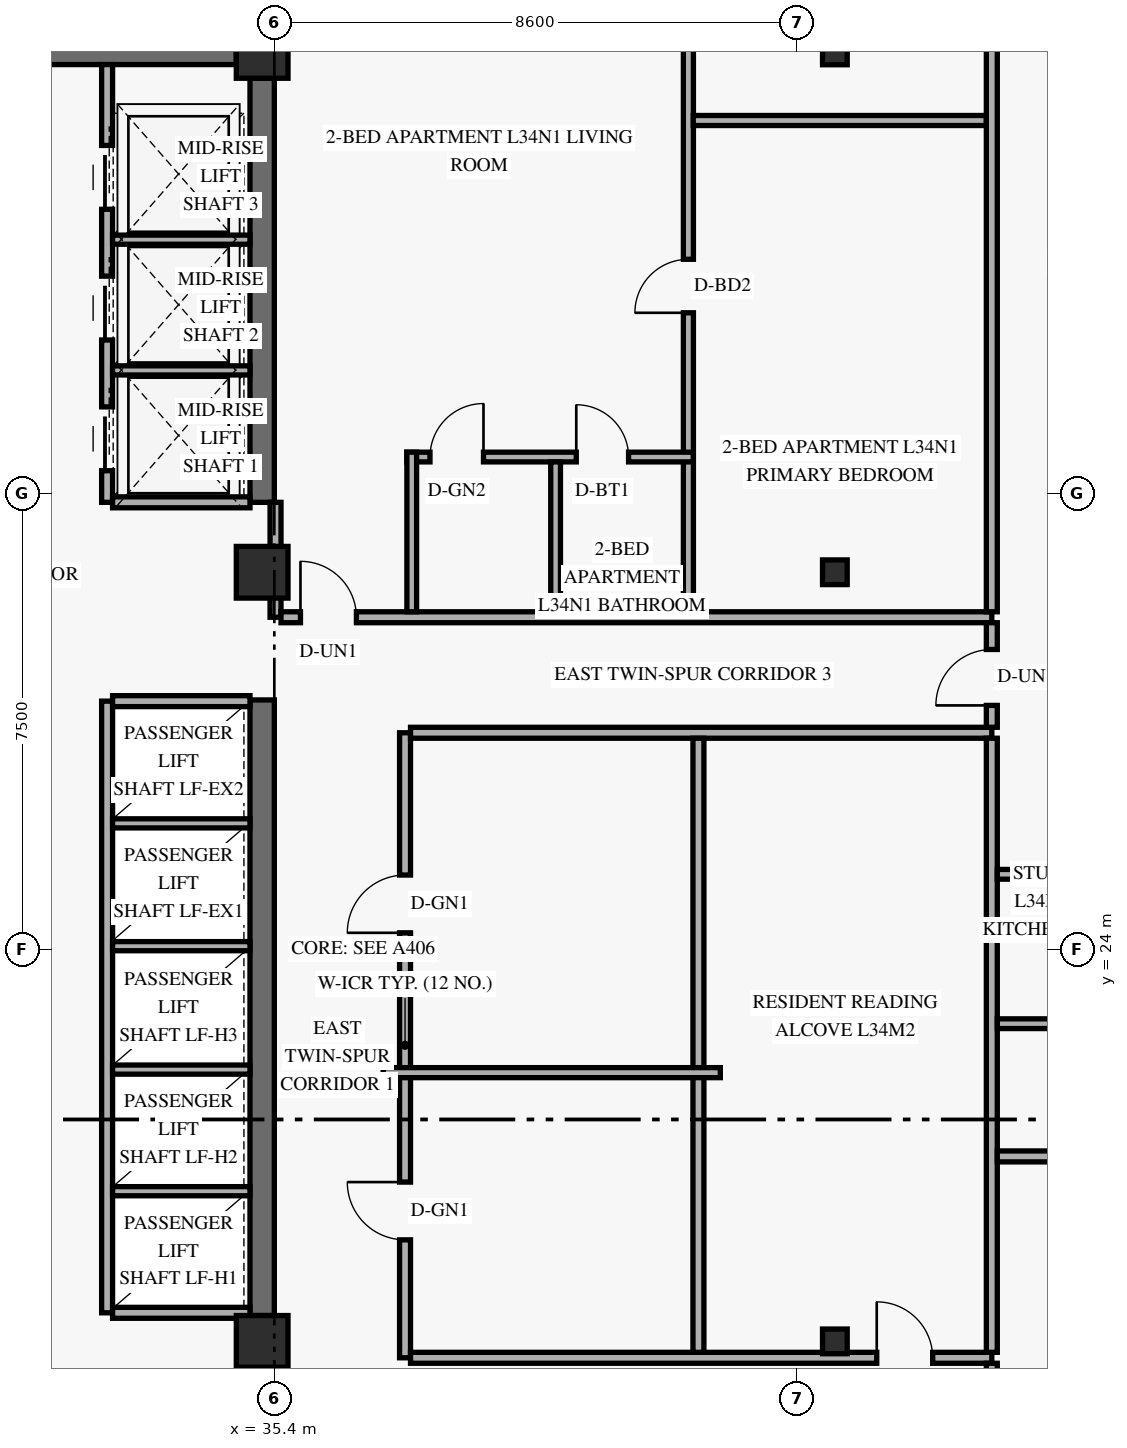
"""IFC4 building model, lengths in metres.
Left out: names, types, materials, properties, quantities, classifications, styles, units other than length and angle.
Written with IfcOpenShell. Run it as: python <this file> out.ifc"""

import sys

from ifc_helpers import new_model, si_unit, direction, frame, frame_2d, origin, origin_2d, place, context, subcontext, project, spatial, rectangle, hollow_rectangle, extrude, element, fill, save


model = new_model("IFC4")
c1 = context("Model", 3, precision=1e-05, world=origin(), true_north=direction((0.0, 1.0)))
c2 = subcontext(c1, "Body", "Model", "MODEL_VIEW")
j1 = project(units=[si_unit("LENGTHUNIT", "METRE"), si_unit("PLANEANGLEUNIT", "RADIAN")], contexts=[c1])
p1 = place(None, origin())
s1 = spatial("IfcSite", under=j1, at=p1, CompositionType="ELEMENT")
p2 = place(p1, origin())
s2 = spatial("IfcBuilding", under=s1, at=p2, CompositionType="ELEMENT")
p3 = place(p2, frame((0.0, 0.0, 132.0)))
s3 = spatial("IfcBuildingStorey", under=s2, at=p3, CompositionType="ELEMENT", Elevation=132.0)
p4 = place(p3, frame((35.2, 17.975, 0.0), z_axis=(0.0, 0.0, 1.0), x_axis=(0.0, 1.0, 0.0)))
e1 = element("IfcWall", 1, at=p4, inside=s3, PredefinedType="SHEAR", context=c2, shape_type="SweptSolid", body=[
    extrude(rectangle(XDim=10.125, YDim=0.4, at=frame_2d((5.062, 0.0))), origin(), (0.0, 0.0, 1.0), 2.689),
])
p5 = place(p3, frame((35.2, 31.35, 0.0), z_axis=(0.0, 0.0, 1.0), x_axis=(0.0, 1.0, 0.0)))
e2 = element("IfcWall", 2, at=p5, inside=s3, PredefinedType="SHEAR", context=c2, shape_type="SweptSolid", body=[
    extrude(rectangle(XDim=6.975, YDim=0.4, at=frame_2d((3.487, 0.0))), origin(), (0.0, 0.0, 1.0), 2.689),
])
p6 = place(p3, frame((24.625, 38.75, 0.0), z_axis=(0.0, 0.0, 1.0), x_axis=(1.0, 0.0, 0.0)))
e3 = element("IfcWall", 3, at=p6, inside=s3, PredefinedType="SHEAR", context=c2, shape_type="SweptSolid", body=[
    extrude(rectangle(XDim=10.15, YDim=0.4, at=frame_2d((5.075, 0.0))), origin(), (0.0, 0.0, 1.0), 3.3),
])
p7 = place(p6, frame((5.2, 0.0, 0.0)))
e4 = element("IfcOpeningElement", 4, at=p7, cuts=e3, PredefinedType="OPENING", context=c2, shape_type="SweptSolid", body=[
    extrude(rectangle(XDim=1.05, YDim=2.15, at=frame_2d((0.525, 1.075))), frame((0.0, 0.21, 0.0), z_axis=(0.0, -1.0, 0.0), x_axis=(1.0, 0.0, 0.0)), (0.0, 0.0, 1.0), 0.42),
])
for number, where, z_axis, x_axis in (
    (5, (35.2, 17.55, 0.0), (0.0, 0.0, 1.0), (1.0, 0.0, 0.0)),
    (6, (35.2, 30.2, 0.0), (0.0, 0.0, 1.0), (1.0, 0.0, 0.0)),
    (7, (35.2, 38.75, 0.0), (0.0, 0.0, 1.0), (1.0, 0.0, 0.0)),
):
    element("IfcColumn", number, at=place(p3, frame(where, z_axis=z_axis, x_axis=x_axis)), inside=s3, PredefinedType="COLUMN", context=c2, shape_type="SweptSolid", body=[
        extrude(rectangle(XDim=0.85, YDim=0.85, at=origin_2d()), origin(), (0.0, 0.0, 1.0), 3.6),
    ])
for number, where, z_axis, x_axis in (
    (8, (44.556, 17.55, 0.0), (0.035, 0.0, 0.999), (0.0, 1.0, 0.0)),
    (9, (44.556, 30.2, 0.0), (0.035, 0.0, 0.999), (0.0, 1.0, 0.0)),
    (10, (44.556, 38.75, 0.0), (0.035, 0.0, 0.999), (0.0, 1.0, 0.0)),
):
    element("IfcColumn", number, at=place(p3, frame(where, z_axis=z_axis, x_axis=x_axis)), inside=s3, PredefinedType="COLUMN", context=c2, shape_type="SweptSolid", body=[
        extrude(hollow_rectangle(XDim=0.406, YDim=0.406, WallThickness=0.016, at=origin_2d()), origin(), (0.0, 0.0, 1.0), 3.602),
    ])
p8 = place(p3, frame((32.65, 18.02, 0.0), z_axis=(0.0, 0.0, 1.0), x_axis=(0.0, 1.0, 0.0)))
e11 = element("IfcWall", 11, at=p8, inside=s3, PredefinedType="STANDARD", context=c2, shape_type="SweptSolid", body=[
    extrude(rectangle(XDim=10.06, YDim=0.18, at=frame_2d((5.03, 0.0))), origin(), (0.0, 0.0, 1.0), 3.3),
])
for number, where, z_axis, x_axis in (
    (12, (32.74, 18.02, 0.0), (0.0, 0.0, 1.0), (1.0, 0.0, 0.0)),
    (13, (32.74, 28.08, 0.0), (0.0, 0.0, 1.0), (1.0, 0.0, 0.0)),
):
    element("IfcWall", number, at=place(p3, frame(where, z_axis=z_axis, x_axis=x_axis)), inside=s3, PredefinedType="STANDARD", context=c2, shape_type="SweptSolid", body=[
        extrude(rectangle(XDim=2.26, YDim=0.18, at=frame_2d((1.13, 0.0))), origin(), (0.0, 0.0, 1.0), 3.3),
    ])
for number, where, z_axis, x_axis in (
    (14, (32.74, 20.02, 0.0), (0.0, 0.0, 1.0), (1.0, 0.0, 0.0)),
    (15, (32.74, 22.02, 0.0), (0.0, 0.0, 1.0), (1.0, 0.0, 0.0)),
    (16, (32.74, 24.05, 0.0), (0.0, 0.0, 1.0), (1.0, 0.0, 0.0)),
    (17, (32.74, 26.07, 0.0), (0.0, 0.0, 1.0), (1.0, 0.0, 0.0)),
):
    element("IfcWall", number, at=place(p3, frame(where, z_axis=z_axis, x_axis=x_axis)), inside=s3, PredefinedType="STANDARD", context=c2, shape_type="SweptSolid", body=[
        extrude(rectangle(XDim=2.26, YDim=0.15, at=frame_2d((1.13, 0.0))), origin(), (0.0, 0.0, 1.0), 3.3),
    ])
p9 = place(p3, frame((32.65, 31.35, 0.0), z_axis=(0.0, 0.0, 1.0), x_axis=(0.0, 1.0, 0.0)))
e18 = element("IfcWall", 18, at=p9, inside=s3, PredefinedType="STANDARD", context=c2, shape_type="SweptSolid", body=[
    extrude(rectangle(XDim=7.2, YDim=0.18, at=frame_2d((3.6, 0.0))), origin(), (0.0, 0.0, 1.0), 3.3),
])
p10 = place(p9, frame((0.52, 0.0, 0.0)))
e19 = element("IfcOpeningElement", 19, at=p10, cuts=e18, PredefinedType="OPENING", context=c2, shape_type="SweptSolid", body=[
    extrude(rectangle(XDim=1.05, YDim=2.2, at=frame_2d((0.525, 1.1))), frame((0.0, 0.1, 0.0), z_axis=(0.0, -1.0, 0.0), x_axis=(1.0, 0.0, 0.0)), (0.0, 0.0, 1.0), 0.2),
])
p11 = place(p9, frame((2.67, 0.0, 0.0)))
e20 = element("IfcOpeningElement", 20, at=p11, cuts=e18, PredefinedType="OPENING", context=c2, shape_type="SweptSolid", body=[
    extrude(rectangle(XDim=1.05, YDim=2.2, at=frame_2d((0.525, 1.1))), frame((0.0, 0.1, 0.0), z_axis=(0.0, -1.0, 0.0), x_axis=(1.0, 0.0, 0.0)), (0.0, 0.0, 1.0), 0.2),
])
p12 = place(p9, frame((4.82, 0.0, 0.0)))
e21 = element("IfcOpeningElement", 21, at=p12, cuts=e18, PredefinedType="OPENING", context=c2, shape_type="SweptSolid", body=[
    extrude(rectangle(XDim=1.05, YDim=2.2, at=frame_2d((0.525, 1.1))), frame((0.0, 0.1, 0.0), z_axis=(0.0, -1.0, 0.0), x_axis=(1.0, 0.0, 0.0)), (0.0, 0.0, 1.0), 0.2),
])
p13 = place(p3, frame((32.74, 31.35, 0.0), z_axis=(0.0, 0.0, 1.0), x_axis=(1.0, 0.0, 0.0)))
e22 = element("IfcWall", 22, at=p13, inside=s3, PredefinedType="STANDARD", context=c2, shape_type="SweptSolid", body=[
    extrude(rectangle(XDim=2.26, YDim=0.18, at=frame_2d((1.13, 0.0))), origin(), (0.0, 0.0, 1.0), 3.3),
])
for number, where, z_axis, x_axis in (
    (23, (32.74, 33.52, 0.0), (0.0, 0.0, 1.0), (1.0, 0.0, 0.0)),
    (24, (32.74, 35.67, 0.0), (0.0, 0.0, 1.0), (1.0, 0.0, 0.0)),
):
    element("IfcWall", number, at=place(p3, frame(where, z_axis=z_axis, x_axis=x_axis)), inside=s3, PredefinedType="STANDARD", context=c2, shape_type="SweptSolid", body=[
        extrude(rectangle(XDim=2.26, YDim=0.15, at=frame_2d((1.13, 0.0))), origin(), (0.0, 0.0, 1.0), 3.3),
    ])
p14 = place(p3, frame((37.55, 17.28, 0.0), z_axis=(0.0, 0.0, 1.0), x_axis=(0.0, 1.0, 0.0)))
e25 = element("IfcWall", 25, at=p14, inside=s3, PredefinedType="STANDARD", context=c2, shape_type="SweptSolid", body=[
    extrude(rectangle(XDim=10.28, YDim=0.18, at=frame_2d((5.14, 0.0))), origin(), (0.0, 0.0, 1.0), 2.671),
])
p15 = place(p14, frame((1.94, 0.0, 0.0)))
e26 = element("IfcOpeningElement", 26, at=p15, cuts=e25, PredefinedType="OPENING", context=c2, shape_type="SweptSolid", body=[
    extrude(rectangle(XDim=0.95, YDim=2.15, at=frame_2d((0.475, 1.075))), frame((0.0, 0.1, 0.0), z_axis=(0.0, -1.0, 0.0), x_axis=(1.0, 0.0, 0.0)), (0.0, 0.0, 1.0), 0.2),
])
p16 = place(p14, frame((6.99, 0.0, 0.0)))
e27 = element("IfcOpeningElement", 27, at=p16, cuts=e25, PredefinedType="OPENING", context=c2, shape_type="SweptSolid", body=[
    extrude(rectangle(XDim=0.95, YDim=2.15, at=frame_2d((0.475, 1.075))), frame((0.0, 0.1, 0.0), z_axis=(0.0, -1.0, 0.0), x_axis=(1.0, 0.0, 0.0)), (0.0, 0.0, 1.0), 0.2),
])
p17 = place(p3, frame((37.64, 17.28, 0.0), z_axis=(0.0, 0.0, 1.0), x_axis=(1.0, 0.0, 0.0)))
e28 = element("IfcWall", 28, at=p17, inside=s3, PredefinedType="STANDARD", context=c2, shape_type="SweptSolid", body=[
    extrude(rectangle(XDim=9.56, YDim=0.18, at=frame_2d((4.78, 0.0))), origin(), (0.0, 0.0, 1.0), 2.671),
])
p18 = place(p17, frame((7.667, 0.0, 0.0)))
e29 = element("IfcOpeningElement", 29, at=p18, cuts=e28, PredefinedType="OPENING", context=c2, shape_type="SweptSolid", body=[
    extrude(rectangle(XDim=0.92, YDim=2.15, at=frame_2d((0.46, 1.075))), frame((0.0, 0.1, 0.0), z_axis=(0.0, -1.0, 0.0), x_axis=(1.0, 0.0, 0.0)), (0.0, 0.0, 1.0), 0.2),
])
p19 = place(p3, frame((37.64, 27.56, 0.0), z_axis=(0.0, 0.0, 1.0), x_axis=(1.0, 0.0, 0.0)))
e30 = element("IfcWall", 30, at=p19, inside=s3, PredefinedType="STANDARD", context=c2, shape_type="SweptSolid", body=[
    extrude(rectangle(XDim=9.56, YDim=0.18, at=frame_2d((4.78, 0.0))), origin(), (0.0, 0.0, 1.0), 2.671),
])
p20 = place(p3, frame((35.42, 29.46, 0.0), z_axis=(0.0, 0.0, 1.0), x_axis=(0.0, 1.0, 0.0)))
e31 = element("IfcWall", 31, at=p20, inside=s3, PredefinedType="STANDARD", context=c2, shape_type="SweptSolid", body=[
    extrude(rectangle(XDim=1.89, YDim=0.18, at=frame_2d((0.945, 0.0))), origin(), (0.0, 0.0, 1.0), 2.671),
])
p21 = place(p3, frame((35.51, 29.46, 0.0), z_axis=(0.0, 0.0, 1.0), x_axis=(1.0, 0.0, 0.0)))
e32 = element("IfcWall", 32, at=p21, inside=s3, PredefinedType="STANDARD", context=c2, shape_type="SweptSolid", body=[
    extrude(rectangle(XDim=11.69, YDim=0.18, at=frame_2d((5.845, 0.0))), origin(), (0.0, 0.0, 1.0), 2.671),
])
p22 = place(p21, frame((0.32, 0.0, 0.0)))
e33 = element("IfcOpeningElement", 33, at=p22, cuts=e32, PredefinedType="OPENING", context=c2, shape_type="SweptSolid", body=[
    extrude(rectangle(XDim=0.92, YDim=2.15, at=frame_2d((0.46, 1.075))), frame((0.0, 0.1, 0.0), z_axis=(0.0, -1.0, 0.0), x_axis=(1.0, 0.0, 0.0)), (0.0, 0.0, 1.0), 0.2),
])
p23 = place(p3, frame((42.21, 29.55, 0.0), z_axis=(0.0, 0.0, 1.0), x_axis=(0.0, 1.0, 0.0)))
e34 = element("IfcWall", 34, at=p23, inside=s3, PredefinedType="PARTITIONING", context=c2, shape_type="SweptSolid", body=[
    extrude(rectangle(XDim=15.47, YDim=0.165, at=frame_2d((7.735, 0.0))), origin(), (0.0, 0.0, 1.0), 2.671),
])
p24 = place(p23, frame((4.917, 0.0, 0.0)))
e35 = element("IfcOpeningElement", 35, at=p24, cuts=e34, PredefinedType="OPENING", context=c2, shape_type="SweptSolid", body=[
    extrude(rectangle(XDim=0.88, YDim=2.14, at=frame_2d((0.44, 1.07))), frame((0.0, 0.093, 0.0), z_axis=(0.0, -1.0, 0.0), x_axis=(1.0, 0.0, 0.0)), (0.0, 0.0, 1.0), 0.185),
])
p25 = place(p23, frame((9.255, 0.0, 0.0)))
e36 = element("IfcOpeningElement", 36, at=p25, cuts=e34, PredefinedType="OPENING", context=c2, shape_type="SweptSolid", body=[
    extrude(rectangle(XDim=0.88, YDim=2.14, at=frame_2d((0.44, 1.07))), frame((0.0, 0.093, 0.0), z_axis=(0.0, -1.0, 0.0), x_axis=(1.0, 0.0, 0.0)), (0.0, 0.0, 1.0), 0.185),
])
p26 = place(p3, frame((37.58, 32.095, 0.0), z_axis=(0.0, 0.0, 1.0), x_axis=(1.0, 0.0, 0.0)))
e37 = element("IfcWall", 37, at=p26, inside=s3, PredefinedType="PLUMBINGWALL", context=c2, shape_type="SweptSolid", body=[
    extrude(rectangle(XDim=4.71, YDim=0.16, at=frame_2d((2.355, 0.0))), origin(), (0.0, 0.0, 1.0), 3.3),
])
p27 = place(p26, frame((0.38, 0.0, 0.0)))
e38 = element("IfcOpeningElement", 38, at=p27, cuts=e37, PredefinedType="OPENING", context=c2, shape_type="SweptSolid", body=[
    extrude(rectangle(XDim=0.88, YDim=2.12, at=frame_2d((0.44, 1.06))), frame((0.0, 0.09, 0.0), z_axis=(0.0, -1.0, 0.0), x_axis=(1.0, 0.0, 0.0)), (0.0, 0.0, 1.0), 0.18),
])
p28 = place(p26, frame((2.786, 0.0, 0.0)))
e39 = element("IfcOpeningElement", 39, at=p28, cuts=e37, PredefinedType="OPENING", context=c2, shape_type="SweptSolid", body=[
    extrude(rectangle(XDim=0.86, YDim=2.12, at=frame_2d((0.43, 1.06))), frame((0.0, 0.09, 0.0), z_axis=(0.0, -1.0, 0.0), x_axis=(1.0, 0.0, 0.0)), (0.0, 0.0, 1.0), 0.18),
])
p29 = place(p3, frame((37.66, 29.55, 0.0), z_axis=(0.0, 0.0, 1.0), x_axis=(0.0, 1.0, 0.0)))
e40 = element("IfcWall", 40, at=p29, inside=s3, PredefinedType="PLUMBINGWALL", context=c2, shape_type="SweptSolid", body=[
    extrude(rectangle(XDim=2.625, YDim=0.16, at=frame_2d((1.312, 0.0))), origin(), (0.0, 0.0, 1.0), 2.671),
])
p30 = place(p3, frame((40.026, 29.55, 0.0), z_axis=(0.0, 0.0, 1.0), x_axis=(0.0, 1.0, 0.0)))
e41 = element("IfcWall", 41, at=p30, inside=s3, PredefinedType="PLUMBINGWALL", context=c2, shape_type="SweptSolid", body=[
    extrude(rectangle(XDim=2.465, YDim=0.16, at=frame_2d((1.232, 0.0))), origin(), (0.0, 0.0, 1.0), 2.671),
])
p31 = place(p3, frame((42.29, 37.63, 0.0), z_axis=(0.0, 0.0, 1.0), x_axis=(1.0, 0.0, 0.0)))
e42 = element("IfcWall", 42, at=p31, inside=s3, PredefinedType="PARTITIONING", context=c2, shape_type="SweptSolid", body=[
    extrude(rectangle(XDim=4.82, YDim=0.165, at=frame_2d((2.41, 0.0))), origin(), (0.0, 0.0, 1.0), 2.671),
])
p32 = place(p3, frame((42.375, 17.37, 0.0), z_axis=(0.0, 0.0, 1.0), x_axis=(0.0, 1.0, 0.0)))
e43 = element("IfcWall", 43, at=p32, inside=s3, PredefinedType="PARTITIONING", context=c2, shape_type="SweptSolid", body=[
    extrude(rectangle(XDim=10.1, YDim=0.18, at=frame_2d((5.05, 0.0))), origin(), (0.0, 0.0, 1.0), 2.671),
])
p33 = place(p3, frame((37.19, 21.97, 0.0), z_axis=(0.0, 0.0, 1.0), x_axis=(1.0, 0.0, 0.0)))
e44 = element("IfcWall", 44, at=p33, inside=s3, PredefinedType="PARTITIONING", context=c2, shape_type="SweptSolid", body=[
    extrude(rectangle(XDim=5.545, YDim=0.165, at=frame_2d((2.772, 0.0))), origin(), (0.0, 0.0, 1.0), 3.3),
])
p34 = place(p3, frame((47.2, 15.67, 0.0), z_axis=(0.0, 0.0, 1.0), x_axis=(0.0, 1.0, 0.0)))
e45 = element("IfcWall", 45, at=p34, inside=s3, PredefinedType="STANDARD", context=c2, shape_type="SweptSolid", body=[
    extrude(rectangle(XDim=1.52, YDim=0.18, at=frame_2d((0.76, 0.0))), origin(), (0.0, 0.0, 1.0), 3.3),
])
p35 = place(p34, frame((0.29, 0.0, 0.0)))
e46 = element("IfcOpeningElement", 46, at=p35, cuts=e45, PredefinedType="OPENING", context=c2, shape_type="SweptSolid", body=[
    extrude(rectangle(XDim=0.92, YDim=2.15, at=frame_2d((0.46, 1.075))), frame((0.0, 0.1, 0.0), z_axis=(0.0, -1.0, 0.0), x_axis=(1.0, 0.0, 0.0)), (0.0, 0.0, 1.0), 0.2),
])
p36 = place(p3, frame((47.2, 27.65, 0.0), z_axis=(0.0, 0.0, 1.0), x_axis=(0.0, 1.0, 0.0)))
e47 = element("IfcWall", 47, at=p36, inside=s3, PredefinedType="STANDARD", context=c2, shape_type="SweptSolid", body=[
    extrude(rectangle(XDim=1.72, YDim=0.18, at=frame_2d((0.86, 0.0))), origin(), (0.0, 0.0, 1.0), 3.3),
])
p37 = place(p36, frame((0.36, 0.0, 0.0)))
e48 = element("IfcOpeningElement", 48, at=p37, cuts=e47, PredefinedType="OPENING", context=c2, shape_type="SweptSolid", body=[
    extrude(rectangle(XDim=0.92, YDim=2.15, at=frame_2d((0.46, 1.075))), frame((0.0, 0.1, 0.0), z_axis=(0.0, -1.0, 0.0), x_axis=(1.0, 0.0, 0.0)), (0.0, 0.0, 1.0), 0.2),
])
p38 = place(p3, frame((47.2, 17.37, 0.0), z_axis=(0.0, 0.0, 1.0), x_axis=(0.0, 1.0, 0.0)))
e49 = element("IfcWall", 49, at=p38, inside=s3, PredefinedType="PARTITIONING", context=c2, shape_type="SweptSolid", body=[
    extrude(rectangle(XDim=10.1, YDim=0.18, at=frame_2d((5.05, 0.0))), origin(), (0.0, 0.0, 1.0), 2.671),
])
p39 = place(p3, frame((47.2, 29.55, 0.0), z_axis=(0.0, 0.0, 1.0), x_axis=(0.0, 1.0, 0.0)))
e50 = element("IfcWall", 50, at=p39, inside=s3, PredefinedType="PARTITIONING", context=c2, shape_type="SweptSolid", body=[
    extrude(rectangle(XDim=15.47, YDim=0.18, at=frame_2d((7.735, 0.0))), origin(), (0.0, 0.0, 1.0), 2.671),
])
p40 = place(p3, frame((47.29, 20.592, 0.0), z_axis=(0.0, 0.0, 1.0), x_axis=(1.0, 0.0, 0.0)))
e51 = element("IfcWall", 51, at=p40, inside=s3, PredefinedType="PARTITIONING", context=c2, shape_type="SweptSolid", body=[
    extrude(rectangle(XDim=6.03, YDim=0.18, at=frame_2d((3.015, 0.0))), origin(), (0.0, 0.0, 1.0), 2.749),
])
p41 = place(p3, frame((47.29, 25.232, 0.0), z_axis=(0.0, 0.0, 1.0), x_axis=(1.0, 0.0, 0.0)))
e52 = element("IfcWall", 52, at=p41, inside=s3, PredefinedType="PLUMBINGWALL", context=c2, shape_type="SweptSolid", body=[
    extrude(rectangle(XDim=2.606, YDim=0.16, at=frame_2d((1.303, 0.0))), origin(), (0.0, 0.0, 1.0), 3.3),
])
p42 = place(p3, frame((47.29, 22.775, 0.0), z_axis=(0.0, 0.0, 1.0), x_axis=(1.0, 0.0, 0.0)))
e53 = element("IfcWall", 53, at=p42, inside=s3, PredefinedType="PLUMBINGWALL", context=c2, shape_type="SweptSolid", body=[
    extrude(rectangle(XDim=2.446, YDim=0.16, at=frame_2d((1.223, 0.0))), origin(), (0.0, 0.0, 1.0), 3.3),
])
p43 = place(p10, origin())
e54 = element("IfcDoor", 54, at=p43, inside=s3, OperationType="SLIDING_TO_LEFT", PredefinedType="DOOR", context=c2, shape_type="SweptSolid", body=[
    extrude(rectangle(XDim=1.05, YDim=2.2, at=frame_2d((0.525, 1.1))), frame((0.0, 0.025, 0.0), z_axis=(0.0, -1.0, 0.0), x_axis=(1.0, 0.0, 0.0)), (0.0, 0.0, 1.0), 0.05),
])
fill(e19, e54)
p44 = place(p11, origin())
e55 = element("IfcDoor", 55, at=p44, inside=s3, OperationType="SLIDING_TO_LEFT", PredefinedType="DOOR", context=c2, shape_type="SweptSolid", body=[
    extrude(rectangle(XDim=1.05, YDim=2.2, at=frame_2d((0.525, 1.1))), frame((0.0, 0.025, 0.0), z_axis=(0.0, -1.0, 0.0), x_axis=(1.0, 0.0, 0.0)), (0.0, 0.0, 1.0), 0.05),
])
fill(e20, e55)
p45 = place(p12, origin())
e56 = element("IfcDoor", 56, at=p45, inside=s3, OperationType="SLIDING_TO_LEFT", PredefinedType="DOOR", context=c2, shape_type="SweptSolid", body=[
    extrude(rectangle(XDim=1.05, YDim=2.2, at=frame_2d((0.525, 1.1))), frame((0.0, 0.025, 0.0), z_axis=(0.0, -1.0, 0.0), x_axis=(1.0, 0.0, 0.0)), (0.0, 0.0, 1.0), 0.05),
])
fill(e21, e56)
p46 = place(p22, origin())
e57 = element("IfcDoor", 57, at=p46, inside=s3, OperationType="SINGLE_SWING_LEFT", PredefinedType="DOOR", context=c2, shape_type="SweptSolid", body=[
    extrude(rectangle(XDim=0.92, YDim=2.15, at=frame_2d((0.46, 1.075))), frame((0.0, 0.025, 0.0), z_axis=(0.0, -1.0, 0.0), x_axis=(1.0, 0.0, 0.0)), (0.0, 0.0, 1.0), 0.05),
])
fill(e33, e57)
p47 = place(p27, origin())
e58 = element("IfcDoor", 58, at=p47, inside=s3, OperationType="SINGLE_SWING_RIGHT", PredefinedType="DOOR", context=c2, shape_type="SweptSolid", body=[
    extrude(rectangle(XDim=0.88, YDim=2.12, at=frame_2d((0.44, 1.06))), frame((0.0, 0.025, 0.0), z_axis=(0.0, -1.0, 0.0), x_axis=(1.0, 0.0, 0.0)), (0.0, 0.0, 1.0), 0.05),
])
fill(e38, e58)
p48 = place(p28, origin())
e59 = element("IfcDoor", 59, at=p48, inside=s3, OperationType="SINGLE_SWING_LEFT", PredefinedType="DOOR", context=c2, shape_type="SweptSolid", body=[
    extrude(rectangle(XDim=0.86, YDim=2.12, at=frame_2d((0.43, 1.06))), frame((0.0, 0.025, 0.0), z_axis=(0.0, -1.0, 0.0), x_axis=(1.0, 0.0, 0.0)), (0.0, 0.0, 1.0), 0.05),
])
fill(e39, e59)
p49 = place(p24, origin())
e60 = element("IfcDoor", 60, at=p49, inside=s3, OperationType="SINGLE_SWING_LEFT", PredefinedType="DOOR", context=c2, shape_type="SweptSolid", body=[
    extrude(rectangle(XDim=0.88, YDim=2.14, at=frame_2d((0.44, 1.07))), frame((0.0, 0.025, 0.0), z_axis=(0.0, -1.0, 0.0), x_axis=(1.0, 0.0, 0.0)), (0.0, 0.0, 1.0), 0.05),
])
fill(e35, e60)
p50 = place(p15, origin())
e61 = element("IfcDoor", 61, at=p50, inside=s3, OperationType="SINGLE_SWING_RIGHT", PredefinedType="DOOR", context=c2, shape_type="SweptSolid", body=[
    extrude(rectangle(XDim=0.95, YDim=2.15, at=frame_2d((0.475, 1.075))), frame((0.0, 0.025, 0.0), z_axis=(0.0, -1.0, 0.0), x_axis=(1.0, 0.0, 0.0)), (0.0, 0.0, 1.0), 0.05),
])
fill(e26, e61)
p51 = place(p16, origin())
e62 = element("IfcDoor", 62, at=p51, inside=s3, OperationType="SINGLE_SWING_LEFT", PredefinedType="DOOR", context=c2, shape_type="SweptSolid", body=[
    extrude(rectangle(XDim=0.95, YDim=2.15, at=frame_2d((0.475, 1.075))), frame((0.0, 0.025, 0.0), z_axis=(0.0, -1.0, 0.0), x_axis=(1.0, 0.0, 0.0)), (0.0, 0.0, 1.0), 0.05),
])
fill(e27, e62)
p52 = place(p18, origin())
e63 = element("IfcDoor", 63, at=p52, inside=s3, OperationType="SINGLE_SWING_LEFT", PredefinedType="DOOR", context=c2, shape_type="SweptSolid", body=[
    extrude(rectangle(XDim=0.92, YDim=2.15, at=frame_2d((0.46, 1.075))), frame((0.0, 0.025, 0.0), z_axis=(0.0, -1.0, 0.0), x_axis=(1.0, 0.0, 0.0)), (0.0, 0.0, 1.0), 0.05),
])
fill(e29, e63)
p53 = place(p37, origin())
e64 = element("IfcDoor", 64, at=p53, inside=s3, OperationType="SINGLE_SWING_LEFT", PredefinedType="DOOR", context=c2, shape_type="SweptSolid", body=[
    extrude(rectangle(XDim=0.92, YDim=2.15, at=frame_2d((0.46, 1.075))), frame((0.0, 0.025, 0.0), z_axis=(0.0, -1.0, 0.0), x_axis=(1.0, 0.0, 0.0)), (0.0, 0.0, 1.0), 0.05),
])
fill(e48, e64)
save(model, sys.argv[1])
